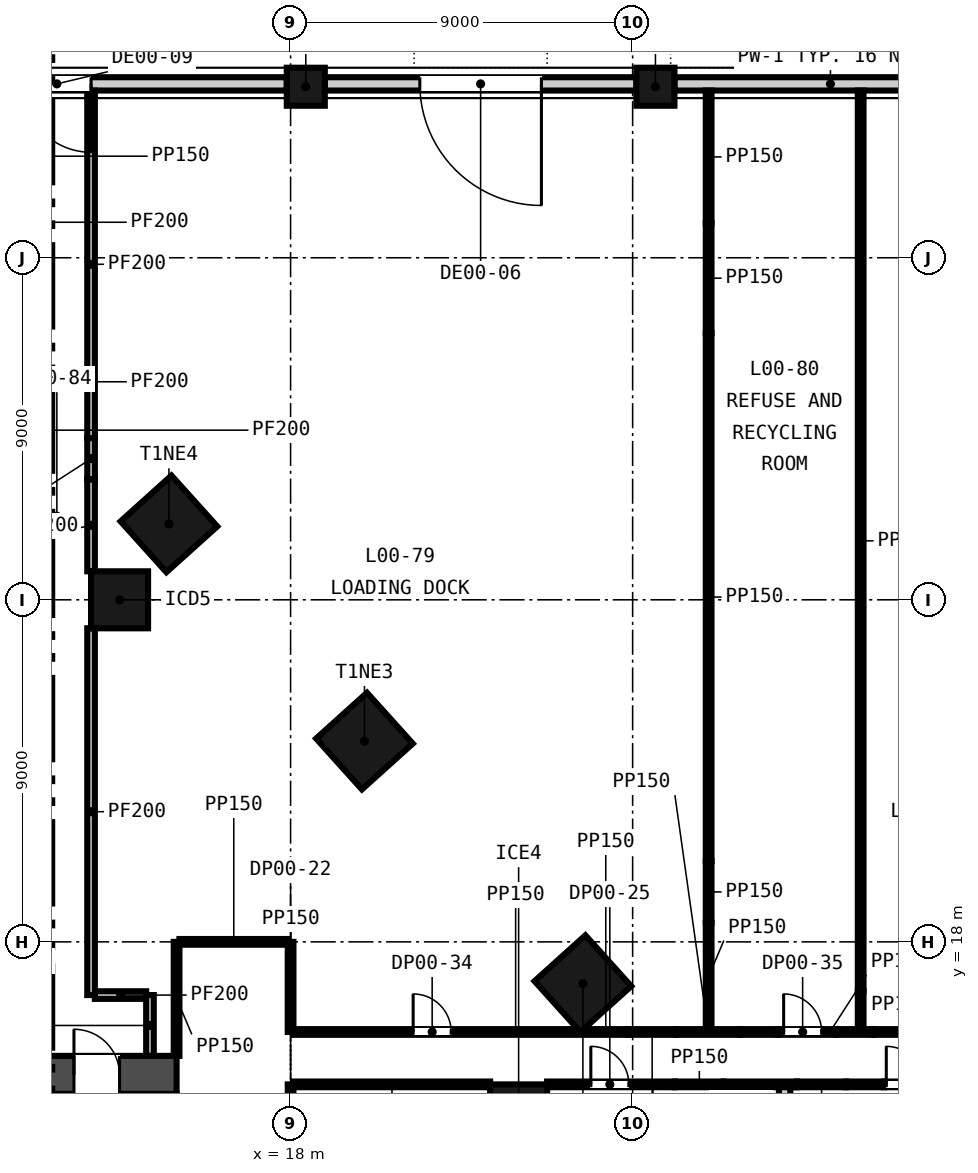
"""IFC4 building model, lengths in metres.
Left out: names, types, materials, properties, quantities, classifications, styles, units other than length and angle.
Written with IfcOpenShell. Run it as: python <this file> out.ifc"""

import sys

from ifc_helpers import new_model, si_unit, direction, frame, frame_2d, origin, origin_2d, place, context, subcontext, project, spatial, rectangle, extrude, element, fill, save


model = new_model("IFC4")
c1 = context("Model", 3, precision=1e-05, world=origin(), true_north=direction((0.0, 1.0)))
c2 = subcontext(c1, "Body", "Model", "MODEL_VIEW")
j1 = project(units=[si_unit("LENGTHUNIT", "METRE"), si_unit("PLANEANGLEUNIT", "RADIAN")], contexts=[c1])
p1 = place(None, origin())
s1 = spatial("IfcSite", under=j1, at=p1, CompositionType="ELEMENT")
p2 = place(p1, origin())
s2 = spatial("IfcBuilding", under=s1, at=p2, CompositionType="ELEMENT")
p3 = place(p2, origin())
s3 = spatial("IfcBuildingStorey", under=s2, at=p3, CompositionType="ELEMENT", Elevation=0.0)
p4 = place(p3, frame((-15.0, 14.5, -2.2), z_axis=(0.0, 0.0, 1.0), x_axis=(1.0, 0.0, 0.0)))
e1 = element("IfcWall", 1, at=p4, inside=s3, PredefinedType="SOLIDWALL", context=c2, shape_type="SweptSolid", body=[
    extrude(rectangle(XDim=30.0, YDim=1.0, at=frame_2d((15.0, 0.0))), origin(), (0.0, 0.0, 1.0), 10.8),
])
p5 = place(p4, frame((9.25, 0.0, 2.2)))
e2 = element("IfcOpeningElement", 2, at=p5, cuts=e1, PredefinedType="OPENING", context=c2, shape_type="SweptSolid", body=[
    extrude(rectangle(XDim=1.5, YDim=2.1, at=frame_2d((0.75, 1.05))), frame((0.0, 0.51, 0.0), z_axis=(0.0, -1.0, 0.0), x_axis=(1.0, 0.0, 0.0)), (0.0, 0.0, 1.0), 1.02),
])
p6 = place(p4, frame((19.4, 0.0, 2.2)))
e3 = element("IfcOpeningElement", 3, at=p6, cuts=e1, PredefinedType="OPENING", context=c2, shape_type="SweptSolid", body=[
    extrude(rectangle(XDim=1.5, YDim=2.1, at=frame_2d((0.75, 1.05))), frame((0.0, 0.51, 0.0), z_axis=(0.0, -1.0, 0.0), x_axis=(1.0, 0.0, 0.0)), (0.0, 0.0, 1.0), 1.02),
])
p7 = place(p4, frame((1.5, 0.0, 2.2)))
e4 = element("IfcOpeningElement", 4, at=p7, cuts=e1, PredefinedType="OPENING", context=c2, shape_type="SweptSolid", body=[
    extrude(rectangle(XDim=1.2, YDim=2.1, at=frame_2d((0.6, 1.05))), frame((0.0, 0.51, 0.0), z_axis=(0.0, -1.0, 0.0), x_axis=(1.0, 0.0, 0.0)), (0.0, 0.0, 1.0), 1.02),
])
p8 = place(p4, frame((27.3, 0.0, 2.2)))
e5 = element("IfcOpeningElement", 5, at=p8, cuts=e1, PredefinedType="OPENING", context=c2, shape_type="SweptSolid", body=[
    extrude(rectangle(XDim=1.2, YDim=2.1, at=frame_2d((0.6, 1.05))), frame((0.0, 0.51, 0.0), z_axis=(0.0, -1.0, 0.0), x_axis=(1.0, 0.0, 0.0)), (0.0, 0.0, 1.0), 1.02),
])
for number, where, z_axis, x_axis in (
    (6, (25.691, 16.9, -0.3), (0.0, 0.0, 1.0), (-0.669, 0.743, 0.0)),
    (7, (19.944, 23.283, -0.3), (0.0, 0.0, 1.0), (-0.669, 0.743, 0.0)),
    (8, (14.799, 28.998, -0.3), (0.0, 0.0, 1.0), (-0.669, 0.743, 0.0)),
):
    element("IfcColumn", number, at=place(p3, frame(where, z_axis=z_axis, x_axis=x_axis)), inside=s3, PredefinedType="COLUMN", context=c2, shape_type="SweptSolid", body=[
        extrude(rectangle(XDim=1.8, YDim=1.8, at=origin_2d()), origin(), (0.0, 0.0, 1.0), 8.9),
    ])
for number, where, z_axis, x_axis in (
    (9, (13.5, 27.0, -0.3), (0.0, 0.0, 1.0), (1.0, 0.0, 0.0)),
    (10, (24.0, 13.5, -0.3), (0.0, 0.0, 1.0), (1.0, 0.0, 0.0)),
):
    element("IfcColumn", number, at=place(p3, frame(where, z_axis=z_axis, x_axis=x_axis)), inside=s3, PredefinedType="COLUMN", context=c2, shape_type="SweptSolid", body=[
        extrude(rectangle(XDim=1.5, YDim=1.5, at=origin_2d()), origin(), (0.0, 0.0, 1.0), 8.9),
    ])
for number, where, z_axis, x_axis in (
    (11, (27.6, 40.5, -0.3), (0.0, 0.0, 1.0), (-1.0, 0.0, 0.0)),
    (12, (18.4, 40.5, -0.3), (0.0, 0.0, 1.0), (-1.0, 0.0, 0.0)),
):
    element("IfcColumn", number, at=place(p3, frame(where, z_axis=z_axis, x_axis=x_axis)), inside=s3, PredefinedType="COLUMN", context=c2, shape_type="SweptSolid", body=[
        extrude(rectangle(XDim=1.0, YDim=1.0, at=origin_2d()), origin(), (0.0, 0.0, 1.0), 8.9),
    ])
p9 = place(p3, frame((36.3, 40.575, -0.3), z_axis=(0.0, 0.0, 1.0), x_axis=(-1.0, 0.0, 0.0)))
e13 = element("IfcWall", 13, at=p9, inside=s3, PredefinedType="SOLIDWALL", context=c2, shape_type="SweptSolid", body=[
    extrude(rectangle(XDim=8.2, YDim=0.35, at=frame_2d((4.1, 0.0))), origin(), (0.0, 0.0, 1.0), 8.0),
])
p10 = place(p3, frame((27.1, 40.575, -0.3), z_axis=(0.0, 0.0, 1.0), x_axis=(-1.0, 0.0, 0.0)))
e14 = element("IfcWall", 14, at=p10, inside=s3, PredefinedType="SOLIDWALL", context=c2, shape_type="SweptSolid", body=[
    extrude(rectangle(XDim=8.2, YDim=0.35, at=frame_2d((4.1, 0.0))), origin(), (0.0, 0.0, 1.0), 8.0),
])
p11 = place(p10, frame((2.5, 0.0, 0.3)))
e15 = element("IfcOpeningElement", 15, at=p11, cuts=e14, PredefinedType="OPENING", context=c2, shape_type="SweptSolid", body=[
    extrude(rectangle(XDim=3.2, YDim=4.0, at=frame_2d((1.6, 2.0))), frame((0.0, 0.185, 0.0), z_axis=(0.0, -1.0, 0.0), x_axis=(1.0, 0.0, 0.0)), (0.0, 0.0, 1.0), 0.37),
])
p12 = place(p3, frame((17.9, 40.575, -0.3), z_axis=(0.0, 0.0, 1.0), x_axis=(-1.0, 0.0, 0.0)))
e16 = element("IfcWall", 16, at=p12, inside=s3, PredefinedType="SOLIDWALL", context=c2, shape_type="SweptSolid", body=[
    extrude(rectangle(XDim=8.2, YDim=0.35, at=frame_2d((4.1, 0.0))), origin(), (0.0, 0.0, 1.0), 8.0),
])
p13 = place(p12, frame((5.15, 0.0, 0.3)))
e17 = element("IfcOpeningElement", 17, at=p13, cuts=e16, PredefinedType="OPENING", context=c2, shape_type="SweptSolid", body=[
    extrude(rectangle(XDim=1.8, YDim=2.4, at=frame_2d((0.9, 1.2))), frame((0.0, 0.185, 0.0), z_axis=(0.0, -1.0, 0.0), x_axis=(1.0, 0.0, 0.0)), (0.0, 0.0, 1.0), 0.37),
])
p14 = place(p3, frame((18.075, 14.25, 0.0), z_axis=(0.0, 0.0, 1.0), x_axis=(1.0, 0.0, 0.0)))
e18 = element("IfcWall", 18, at=p14, inside=s3, PredefinedType="PARTITIONING", context=c2, shape_type="SweptSolid", body=[
    extrude(rectangle(XDim=5.175, YDim=0.15, at=frame_2d((2.587, 0.0))), origin(), (0.0, 0.0, 1.0), 8.6),
])
p15 = place(p3, frame((24.75, 14.25, 0.0), z_axis=(0.0, 0.0, 1.0), x_axis=(1.0, 0.0, 0.0)))
e19 = element("IfcWall", 19, at=p15, inside=s3, PredefinedType="PARTITIONING", context=c2, shape_type="SweptSolid", body=[
    extrude(rectangle(XDim=3.361, YDim=0.15, at=frame_2d((1.681, 0.0))), origin(), (0.0, 0.0, 1.0), 8.6),
])
p16 = place(p15, frame((1.15, 0.0, 0.0)))
e20 = element("IfcOpeningElement", 20, at=p16, cuts=e19, PredefinedType="OPENING", context=c2, shape_type="SweptSolid", body=[
    extrude(rectangle(XDim=1.0, YDim=2.1, at=frame_2d((0.5, 1.05))), frame((0.0, 0.085, 0.0), z_axis=(0.0, -1.0, 0.0), x_axis=(1.0, 0.0, 0.0)), (0.0, 0.0, 1.0), 0.17),
])
p17 = place(p3, frame((28.111, 14.25, 0.0), z_axis=(0.0, 0.0, 1.0), x_axis=(1.0, 0.0, 0.0)))
e21 = element("IfcWall", 21, at=p17, inside=s3, PredefinedType="PARTITIONING", context=c2, shape_type="SweptSolid", body=[
    extrude(rectangle(XDim=1.278, YDim=0.15, at=frame_2d((0.639, 0.0))), origin(), (0.0, 0.0, 1.0), 7.6),
])
p18 = place(p3, frame((29.389, 14.25, 0.0), z_axis=(0.0, 0.0, 1.0), x_axis=(1.0, 0.0, 0.0)))
e22 = element("IfcWall", 22, at=p18, inside=s3, PredefinedType="PARTITIONING", context=c2, shape_type="SweptSolid", body=[
    extrude(rectangle(XDim=1.929, YDim=0.15, at=frame_2d((0.965, 0.0))), origin(), (0.0, 0.0, 1.0), 7.511),
])
p19 = place(p3, frame((31.319, 14.25, 0.0), z_axis=(0.0, 0.0, 1.0), x_axis=(1.0, 0.0, 0.0)))
e23 = element("IfcWall", 23, at=p19, inside=s3, PredefinedType="PARTITIONING", context=c2, shape_type="SweptSolid", body=[
    extrude(rectangle(XDim=1.295, YDim=0.15, at=frame_2d((0.648, 0.0))), origin(), (0.0, 0.0, 1.0), 8.6),
])
p20 = place(p3, frame((32.614, 14.25, 0.0), z_axis=(0.0, 0.0, 1.0), x_axis=(1.0, 0.0, 0.0)))
e24 = element("IfcWall", 24, at=p20, inside=s3, PredefinedType="PARTITIONING", context=c2, shape_type="SweptSolid", body=[
    extrude(rectangle(XDim=1.0, YDim=0.15, at=frame_2d((0.5, 0.0))), origin(), (0.0, 0.0, 1.0), 7.511),
])
p21 = place(p3, frame((33.614, 14.25, 0.0), z_axis=(0.0, 0.0, 1.0), x_axis=(1.0, 0.0, 0.0)))
e25 = element("IfcWall", 25, at=p21, inside=s3, PredefinedType="PARTITIONING", context=c2, shape_type="SweptSolid", body=[
    extrude(rectangle(XDim=1.162, YDim=0.15, at=frame_2d((0.581, 0.0))), origin(), (0.0, 0.0, 1.0), 8.6),
])
p22 = place(p21, frame((0.06, 0.0, 0.0)))
e26 = element("IfcOpeningElement", 26, at=p22, cuts=e25, PredefinedType="OPENING", context=c2, shape_type="SweptSolid", body=[
    extrude(rectangle(XDim=1.0, YDim=2.1, at=frame_2d((0.5, 1.05))), frame((0.0, 0.085, 0.0), z_axis=(0.0, -1.0, 0.0), x_axis=(1.0, 0.0, 0.0)), (0.0, 0.0, 1.0), 0.17),
])
p23 = place(p3, frame((18.075, 15.629, 0.0), z_axis=(0.0, 0.0, 1.0), x_axis=(1.0, 0.0, 0.0)))
e27 = element("IfcWall", 27, at=p23, inside=s3, PredefinedType="PARTITIONING", context=c2, shape_type="SweptSolid", body=[
    extrude(rectangle(XDim=7.482, YDim=0.15, at=frame_2d((3.741, 0.0))), origin(), (0.0, 0.0, 1.0), 8.6),
])
p24 = place(p23, frame((3.15, 0.0, 0.0)))
e28 = element("IfcOpeningElement", 28, at=p24, cuts=e27, PredefinedType="OPENING", context=c2, shape_type="SweptSolid", body=[
    extrude(rectangle(XDim=1.0, YDim=2.1, at=frame_2d((0.5, 1.05))), frame((0.0, 0.085, 0.0), z_axis=(0.0, -1.0, 0.0), x_axis=(1.0, 0.0, 0.0)), (0.0, 0.0, 1.0), 0.17),
])
p25 = place(p3, frame((25.708, 15.629, 0.0), z_axis=(0.0, 0.0, 1.0), x_axis=(1.0, 0.0, 0.0)))
e29 = element("IfcWall", 29, at=p25, inside=s3, PredefinedType="PARTITIONING", context=c2, shape_type="SweptSolid", body=[
    extrude(rectangle(XDim=1.162, YDim=0.15, at=frame_2d((0.581, 0.0))), origin(), (0.0, 0.0, 1.0), 8.6),
])
p26 = place(p3, frame((26.869, 15.629, 0.0), z_axis=(0.0, 0.0, 1.0), x_axis=(1.0, 0.0, 0.0)))
e30 = element("IfcWall", 30, at=p26, inside=s3, PredefinedType="PARTITIONING", context=c2, shape_type="SweptSolid", body=[
    extrude(rectangle(XDim=1.278, YDim=0.15, at=frame_2d((0.639, 0.0))), origin(), (0.0, 0.0, 1.0), 7.6),
])
p27 = place(p3, frame((28.148, 15.629, 0.0), z_axis=(0.0, 0.0, 1.0), x_axis=(1.0, 0.0, 0.0)))
e31 = element("IfcWall", 31, at=p27, inside=s3, PredefinedType="PARTITIONING", context=c2, shape_type="SweptSolid", body=[
    extrude(rectangle(XDim=1.676, YDim=0.15, at=frame_2d((0.838, 0.0))), origin(), (0.0, 0.0, 1.0), 8.6),
])
p28 = place(p3, frame((29.823, 15.629, 0.0), z_axis=(0.0, 0.0, 1.0), x_axis=(1.0, 0.0, 0.0)))
e32 = element("IfcWall", 32, at=p28, inside=s3, PredefinedType="PARTITIONING", context=c2, shape_type="SweptSolid", body=[
    extrude(rectangle(XDim=1.0, YDim=0.15, at=frame_2d((0.5, 0.0))), origin(), (0.0, 0.0, 1.0), 7.511),
])
p29 = place(p3, frame((30.823, 15.629, 0.0), z_axis=(0.0, 0.0, 1.0), x_axis=(1.0, 0.0, 0.0)))
e33 = element("IfcWall", 33, at=p29, inside=s3, PredefinedType="PARTITIONING", context=c2, shape_type="SweptSolid", body=[
    extrude(rectangle(XDim=1.523, YDim=0.15, at=frame_2d((0.762, 0.0))), origin(), (0.0, 0.0, 1.0), 8.6),
])
p30 = place(p29, frame((0.15, 0.0, 0.0)))
e34 = element("IfcOpeningElement", 34, at=p30, cuts=e33, PredefinedType="OPENING", context=c2, shape_type="SweptSolid", body=[
    extrude(rectangle(XDim=1.0, YDim=2.1, at=frame_2d((0.5, 1.05))), frame((0.0, 0.085, 0.0), z_axis=(0.0, -1.0, 0.0), x_axis=(1.0, 0.0, 0.0)), (0.0, 0.0, 1.0), 0.17),
])
p31 = place(p3, frame((32.346, 15.629, 0.0), z_axis=(0.0, 0.0, 1.0), x_axis=(1.0, 0.0, 0.0)))
e35 = element("IfcWall", 35, at=p31, inside=s3, PredefinedType="PARTITIONING", context=c2, shape_type="SweptSolid", body=[
    extrude(rectangle(XDim=1.0, YDim=0.15, at=frame_2d((0.5, 0.0))), origin(), (0.0, 0.0, 1.0), 7.511),
])
p32 = place(p3, frame((33.346, 15.629, 0.0), z_axis=(0.0, 0.0, 1.0), x_axis=(1.0, 0.0, 0.0)))
e36 = element("IfcWall", 36, at=p32, inside=s3, PredefinedType="PARTITIONING", context=c2, shape_type="SweptSolid", body=[
    extrude(rectangle(XDim=1.376, YDim=0.15, at=frame_2d((0.688, 0.0))), origin(), (0.0, 0.0, 1.0), 8.6),
])
p33 = place(p3, frame((12.85, 16.6, 0.0), z_axis=(0.0, 0.0, 1.0), x_axis=(1.0, 0.0, 0.0)))
e37 = element("IfcWall", 37, at=p33, inside=s3, PredefinedType="PARTITIONING", context=c2, shape_type="SweptSolid", body=[
    extrude(rectangle(XDim=1.35, YDim=0.2, at=frame_2d((0.675, 0.0))), origin(), (0.0, 0.0, 1.0), 8.6),
])
p34 = place(p3, frame((15.075, 18.0, 0.0), z_axis=(0.0, 0.0, 1.0), x_axis=(1.0, 0.0, 0.0)))
e38 = element("IfcWall", 38, at=p34, inside=s3, PredefinedType="PARTITIONING", context=c2, shape_type="SweptSolid", body=[
    extrude(rectangle(XDim=2.85, YDim=0.15, at=frame_2d((1.425, 0.0))), origin(), (0.0, 0.0, 1.0), 8.6),
])
p35 = place(p3, frame((12.75, 16.6, 0.0), z_axis=(0.0, 0.0, 1.0), x_axis=(0.0, 1.0, 0.0)))
e39 = element("IfcWall", 39, at=p35, inside=s3, PredefinedType="PARTITIONING", context=c2, shape_type="SweptSolid", body=[
    extrude(rectangle(XDim=9.65, YDim=0.2, at=frame_2d((4.825, 0.0))), origin(), (0.0, 0.0, 1.0), 8.6),
])
p36 = place(p3, frame((12.75, 27.75, 0.0), z_axis=(0.0, 0.0, 1.0), x_axis=(0.0, 1.0, 0.0)))
e40 = element("IfcWall", 40, at=p36, inside=s3, PredefinedType="PARTITIONING", context=c2, shape_type="SweptSolid", body=[
    extrude(rectangle(XDim=2.424, YDim=0.2, at=frame_2d((1.212, 0.0))), origin(), (0.0, 0.0, 1.0), 8.6),
])
p37 = place(p3, frame((12.75, 30.174, 0.0), z_axis=(0.0, 0.0, 1.0), x_axis=(0.0, 1.0, 0.0)))
e41 = element("IfcWall", 41, at=p37, inside=s3, PredefinedType="PARTITIONING", context=c2, shape_type="SweptSolid", body=[
    extrude(rectangle(XDim=1.083, YDim=0.2, at=frame_2d((0.542, 0.0))), origin(), (0.0, 0.0, 1.0), 7.6),
])
p38 = place(p3, frame((12.75, 31.257, 0.0), z_axis=(0.0, 0.0, 1.0), x_axis=(0.0, 1.0, 0.0)))
e42 = element("IfcWall", 42, at=p38, inside=s3, PredefinedType="PARTITIONING", context=c2, shape_type="SweptSolid", body=[
    extrude(rectangle(XDim=9.143, YDim=0.2, at=frame_2d((4.572, 0.0))), origin(), (0.0, 0.0, 1.0), 8.6),
])
p39 = place(p3, frame((14.3, 15.0, 0.0), z_axis=(0.0, 0.0, 1.0), x_axis=(0.0, 1.0, 0.0)))
e43 = element("IfcWall", 43, at=p39, inside=s3, PredefinedType="PARTITIONING", context=c2, shape_type="SweptSolid", body=[
    extrude(rectangle(XDim=1.6, YDim=0.2, at=frame_2d((0.8, 0.0))), origin(), (0.0, 0.0, 1.0), 8.6),
])
p40 = place(p3, frame((15.0, 15.0, 0.0), z_axis=(0.0, 0.0, 1.0), x_axis=(0.0, 1.0, 0.0)))
e44 = element("IfcWall", 44, at=p40, inside=s3, PredefinedType="PARTITIONING", context=c2, shape_type="SweptSolid", body=[
    extrude(rectangle(XDim=3.0, YDim=0.15, at=frame_2d((1.5, 0.0))), origin(), (0.0, 0.0, 1.0), 8.6),
])
p41 = place(p3, frame((18.0, 0.0, 0.0), z_axis=(0.0, 0.0, 1.0), x_axis=(0.0, 1.0, 0.0)))
e45 = element("IfcWall", 45, at=p41, inside=s3, PredefinedType="PARTITIONING", context=c2, shape_type="SweptSolid", body=[
    extrude(rectangle(XDim=14.25, YDim=0.15, at=frame_2d((7.125, 0.0))), origin(), (0.0, 0.0, 1.0), 8.6),
])
p42 = place(p41, frame((2.4, 0.0, 0.0)))
e46 = element("IfcOpeningElement", 46, at=p42, cuts=e45, PredefinedType="OPENING", context=c2, shape_type="SweptSolid", body=[
    extrude(rectangle(XDim=1.0, YDim=2.1, at=frame_2d((0.5, 1.05))), frame((0.0, 0.085, 0.0), z_axis=(0.0, -1.0, 0.0), x_axis=(1.0, 0.0, 0.0)), (0.0, 0.0, 1.0), 0.17),
])
p43 = place(p3, frame((18.0, 15.629, 0.0), z_axis=(0.0, 0.0, 1.0), x_axis=(0.0, 1.0, 0.0)))
e47 = element("IfcWall", 47, at=p43, inside=s3, PredefinedType="PARTITIONING", context=c2, shape_type="SweptSolid", body=[
    extrude(rectangle(XDim=2.371, YDim=0.15, at=frame_2d((1.185, 0.0))), origin(), (0.0, 0.0, 1.0), 8.6),
])
p44 = place(p3, frame((29.0, 15.704, 0.0), z_axis=(0.0, 0.0, 1.0), x_axis=(0.0, 1.0, 0.0)))
e48 = element("IfcWall", 48, at=p44, inside=s3, PredefinedType="PARTITIONING", context=c2, shape_type="SweptSolid", body=[
    extrude(rectangle(XDim=2.796, YDim=0.15, at=frame_2d((1.398, 0.0))), origin(), (0.0, 0.0, 1.0), 8.6),
])
p45 = place(p3, frame((29.0, 18.5, 0.0), z_axis=(0.0, 0.0, 1.0), x_axis=(0.0, 1.0, 0.0)))
e49 = element("IfcWall", 49, at=p45, inside=s3, PredefinedType="PARTITIONING", context=c2, shape_type="SweptSolid", body=[
    extrude(rectangle(XDim=1.627, YDim=0.15, at=frame_2d((0.813, 0.0))), origin(), (0.0, 0.0, 1.0), 7.511),
])
p46 = place(p3, frame((29.0, 20.127, 0.0), z_axis=(0.0, 0.0, 1.0), x_axis=(0.0, 1.0, 0.0)))
e50 = element("IfcWall", 50, at=p46, inside=s3, PredefinedType="PARTITIONING", context=c2, shape_type="SweptSolid", body=[
    extrude(rectangle(XDim=13.891, YDim=0.15, at=frame_2d((6.945, 0.0))), origin(), (0.0, 0.0, 1.0), 8.6),
])
p47 = place(p3, frame((29.0, 34.018, 0.0), z_axis=(0.0, 0.0, 1.0), x_axis=(0.0, 1.0, 0.0)))
e51 = element("IfcWall", 51, at=p47, inside=s3, PredefinedType="PARTITIONING", context=c2, shape_type="SweptSolid", body=[
    extrude(rectangle(XDim=2.889, YDim=0.15, at=frame_2d((1.444, 0.0))), origin(), (0.0, 0.0, 1.0), 7.511),
])
p48 = place(p3, frame((29.0, 36.907, 0.0), z_axis=(0.0, 0.0, 1.0), x_axis=(0.0, 1.0, 0.0)))
e52 = element("IfcWall", 52, at=p48, inside=s3, PredefinedType="PARTITIONING", context=c2, shape_type="SweptSolid", body=[
    extrude(rectangle(XDim=3.493, YDim=0.15, at=frame_2d((1.747, 0.0))), origin(), (0.0, 0.0, 1.0), 8.6),
])
p49 = place(p3, frame((31.0, 11.469, 0.0), z_axis=(0.0, 0.0, 1.0), x_axis=(0.0, 1.0, 0.0)))
e53 = element("IfcWall", 53, at=p49, inside=s3, PredefinedType="PARTITIONING", context=c2, shape_type="SweptSolid", body=[
    extrude(rectangle(XDim=2.707, YDim=0.3, at=frame_2d((1.353, 0.0))), origin(), (0.0, 0.0, 1.0), 7.511),
])
p50 = place(p3, frame((33.0, 15.704, 0.0), z_axis=(0.0, 0.0, 1.0), x_axis=(0.0, 1.0, 0.0)))
e54 = element("IfcWall", 54, at=p50, inside=s3, PredefinedType="PARTITIONING", context=c2, shape_type="SweptSolid", body=[
    extrude(rectangle(XDim=1.0, YDim=0.15, at=frame_2d((0.5, 0.0))), origin(), (0.0, 0.0, 1.0), 7.511),
])
p51 = place(p3, frame((33.0, 16.704, 0.0), z_axis=(0.0, 0.0, 1.0), x_axis=(0.0, 1.0, 0.0)))
e55 = element("IfcWall", 55, at=p51, inside=s3, PredefinedType="PARTITIONING", context=c2, shape_type="SweptSolid", body=[
    extrude(rectangle(XDim=23.696, YDim=0.15, at=frame_2d((11.848, 0.0))), origin(), (0.0, 0.0, 1.0), 8.6),
])
p52 = place(p11, origin())
e56 = element("IfcDoor", 56, at=p52, inside=s3, OperationType="ROLLINGUP", PredefinedType="GATE", context=c2, shape_type="SweptSolid", body=[
    extrude(rectangle(XDim=3.2, YDim=4.0, at=frame_2d((1.6, 2.0))), frame((0.0, 0.025, 0.0), z_axis=(0.0, -1.0, 0.0), x_axis=(1.0, 0.0, 0.0)), (0.0, 0.0, 1.0), 0.05),
])
fill(e15, e56)
p53 = place(p13, frame((1.8, 0.0, 0.0), z_axis=(0.0, 0.0, 1.0), x_axis=(-1.0, 0.0, 0.0)))
e57 = element("IfcDoor", 57, at=p53, inside=s3, OperationType="SINGLE_SWING_LEFT", PredefinedType="DOOR", context=c2, shape_type="SweptSolid", body=[
    extrude(rectangle(XDim=1.8, YDim=2.4, at=frame_2d((0.9, 1.2))), frame((0.0, 0.025, 0.0), z_axis=(0.0, -1.0, 0.0), x_axis=(1.0, 0.0, 0.0)), (0.0, 0.0, 1.0), 0.05),
])
fill(e17, e57)
p54 = place(p8, origin())
e58 = element("IfcDoor", 58, at=p54, inside=s3, OperationType="SINGLE_SWING_LEFT", PredefinedType="DOOR", context=c2, shape_type="SweptSolid", body=[
    extrude(rectangle(XDim=1.2, YDim=2.1, at=frame_2d((0.6, 1.05))), frame((0.0, 0.025, 0.0), z_axis=(0.0, -1.0, 0.0), x_axis=(1.0, 0.0, 0.0)), (0.0, 0.0, 1.0), 0.05),
])
fill(e5, e58)
p55 = place(p16, origin())
e59 = element("IfcDoor", 59, at=p55, inside=s3, OperationType="SINGLE_SWING_LEFT", PredefinedType="DOOR", context=c2, shape_type="SweptSolid", body=[
    extrude(rectangle(XDim=1.0, YDim=2.1, at=frame_2d((0.5, 1.05))), frame((0.0, 0.025, 0.0), z_axis=(0.0, -1.0, 0.0), x_axis=(1.0, 0.0, 0.0)), (0.0, 0.0, 1.0), 0.05),
])
fill(e20, e59)
p56 = place(p22, origin())
e60 = element("IfcDoor", 60, at=p56, inside=s3, OperationType="SINGLE_SWING_LEFT", PredefinedType="DOOR", context=c2, shape_type="SweptSolid", body=[
    extrude(rectangle(XDim=1.0, YDim=2.1, at=frame_2d((0.5, 1.05))), frame((0.0, 0.025, 0.0), z_axis=(0.0, -1.0, 0.0), x_axis=(1.0, 0.0, 0.0)), (0.0, 0.0, 1.0), 0.05),
])
fill(e26, e60)
p57 = place(p24, origin())
e61 = element("IfcDoor", 61, at=p57, inside=s3, OperationType="SINGLE_SWING_LEFT", PredefinedType="DOOR", context=c2, shape_type="SweptSolid", body=[
    extrude(rectangle(XDim=1.0, YDim=2.1, at=frame_2d((0.5, 1.05))), frame((0.0, 0.025, 0.0), z_axis=(0.0, -1.0, 0.0), x_axis=(1.0, 0.0, 0.0)), (0.0, 0.0, 1.0), 0.05),
])
fill(e28, e61)
p58 = place(p30, origin())
e62 = element("IfcDoor", 62, at=p58, inside=s3, OperationType="SINGLE_SWING_LEFT", PredefinedType="DOOR", context=c2, shape_type="SweptSolid", body=[
    extrude(rectangle(XDim=1.0, YDim=2.1, at=frame_2d((0.5, 1.05))), frame((0.0, 0.025, 0.0), z_axis=(0.0, -1.0, 0.0), x_axis=(1.0, 0.0, 0.0)), (0.0, 0.0, 1.0), 0.05),
])
fill(e34, e62)
save(model, sys.argv[1])
